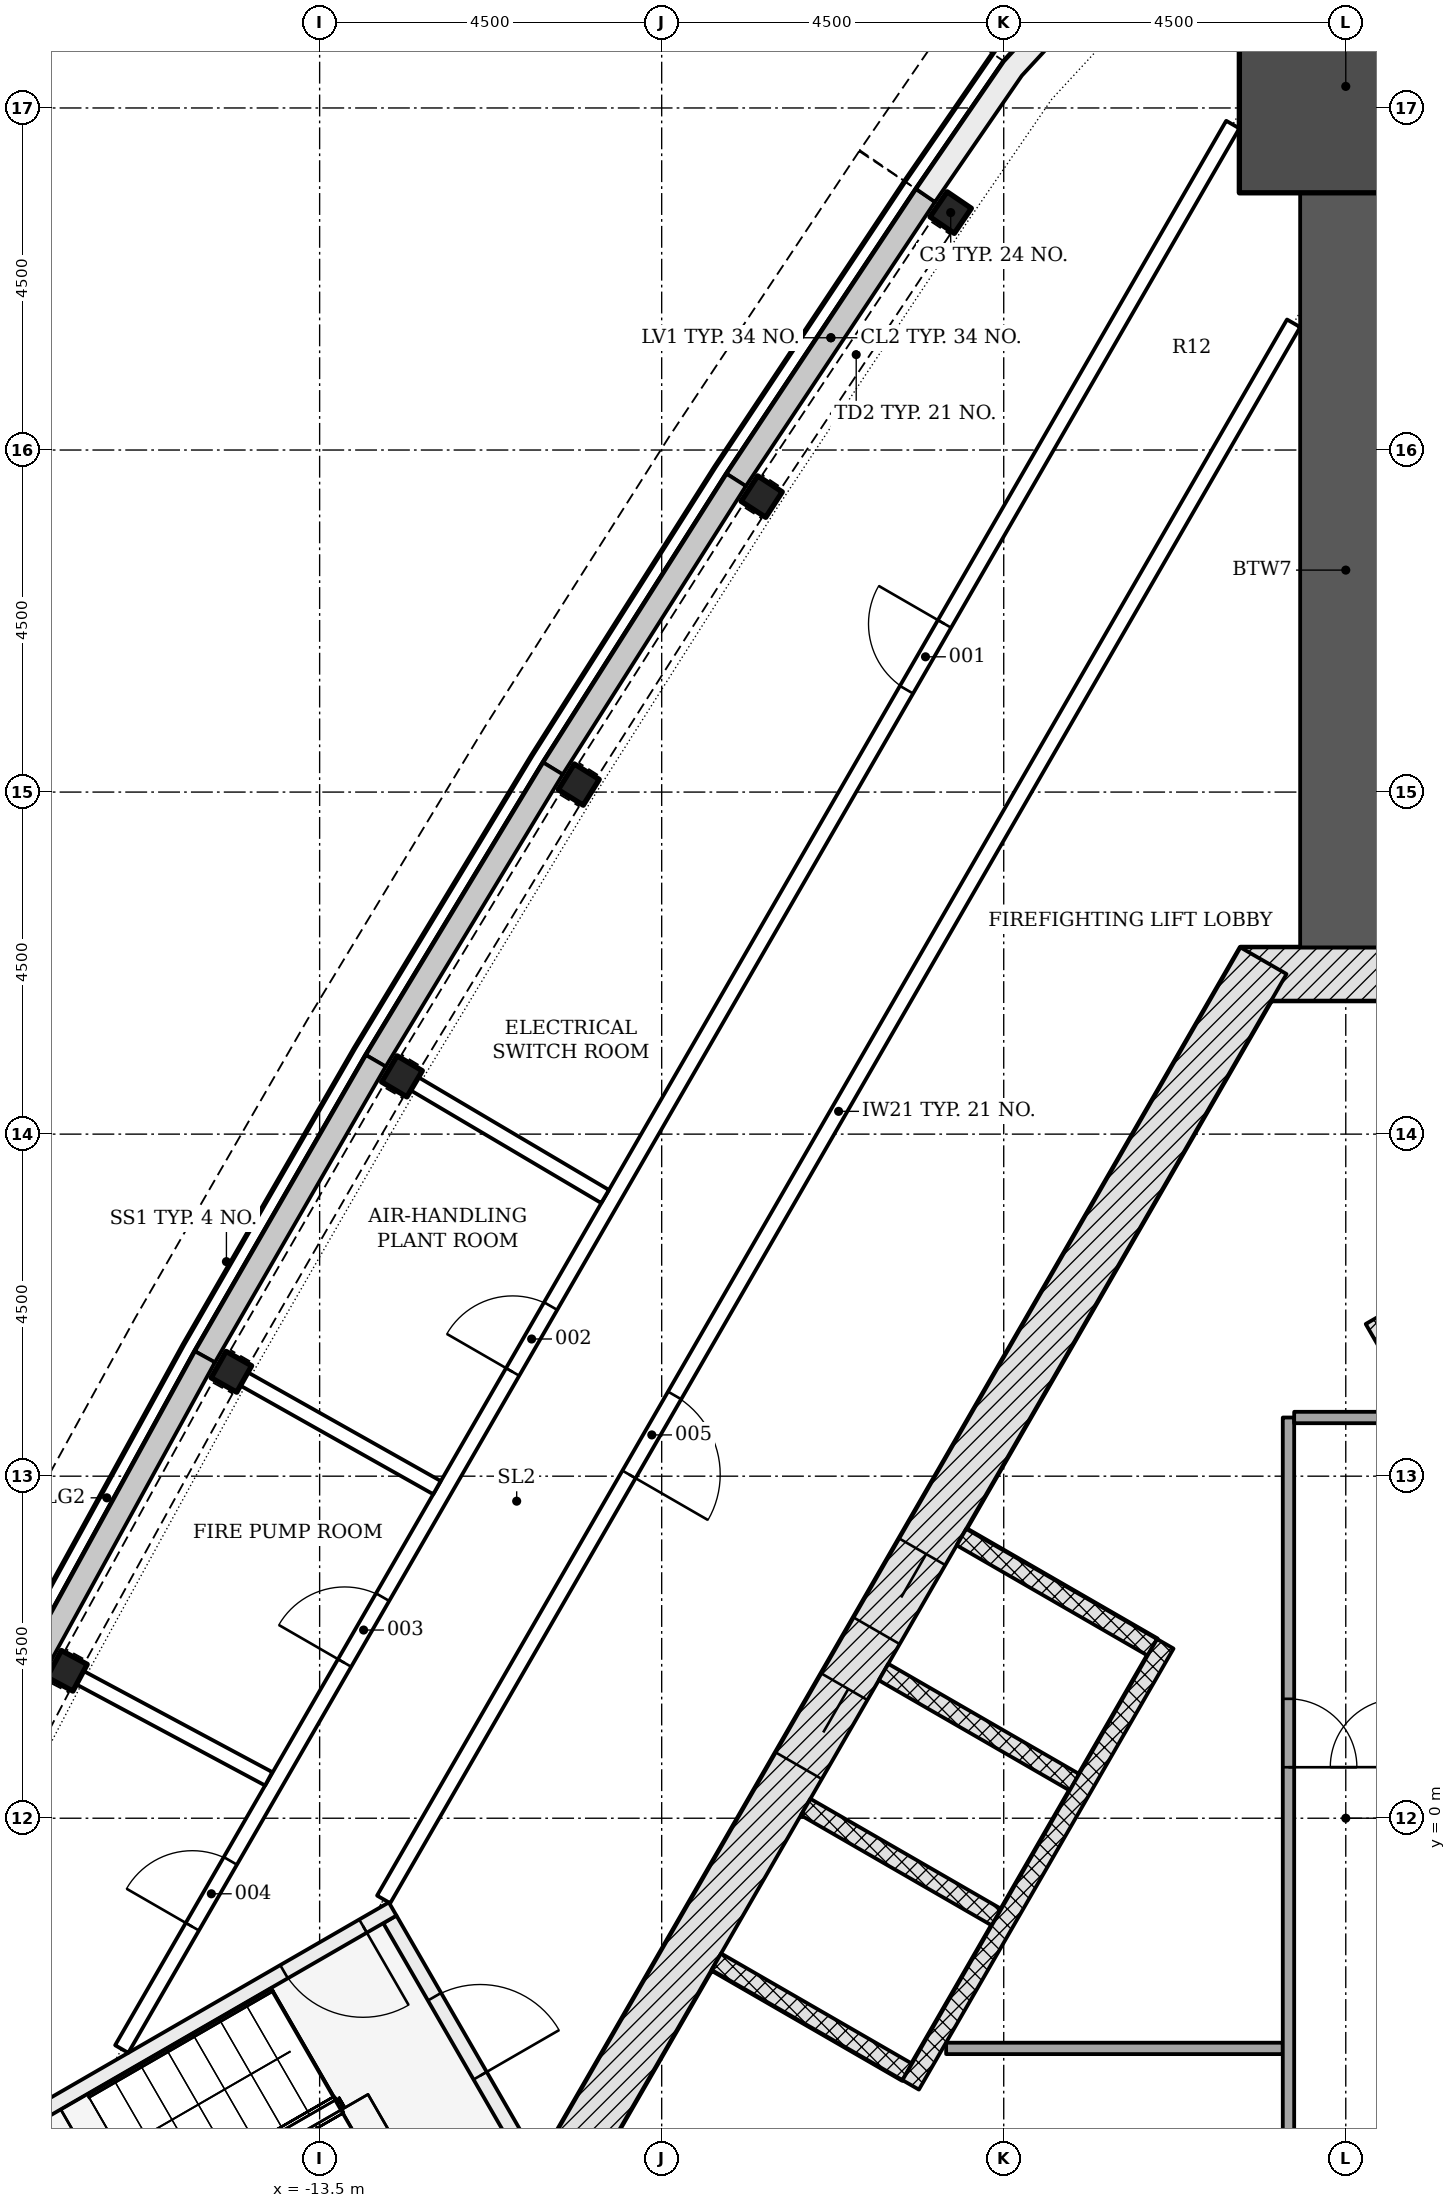
"""IFC4 building model, lengths in metres.
Left out: names, types, materials, properties, quantities, classifications, styles, units other than length and angle.
Written with IfcOpenShell. Run it as: python <this file> out.ifc"""

import sys

from ifc_helpers import new_model, si_unit, direction, frame, frame_2d, origin, origin_2d, place, context, subcontext, project, spatial, polyline, rectangle, i_section, outline, extrude, element, fill, save


model = new_model("IFC4")
c1 = context("Model", 3, precision=1e-05, world=origin(), true_north=direction((0.0, 1.0)))
c2 = subcontext(c1, "Body", "Model", "MODEL_VIEW")
j1 = project(units=[si_unit("LENGTHUNIT", "METRE"), si_unit("PLANEANGLEUNIT", "RADIAN")], contexts=[c1])
p1 = place(None, origin())
s1 = spatial("IfcSite", under=j1, at=p1, CompositionType="ELEMENT")
p2 = place(p1, origin())
s2 = spatial("IfcBuilding", under=s1, at=p2, CompositionType="ELEMENT")
p3 = place(p2, frame((0.0, 0.0, 168.9)))
s3 = spatial("IfcBuildingStorey", under=s2, at=p3, CompositionType="ELEMENT", Elevation=168.9)
p4 = place(p3, frame((1.386, 11.106, -0.3), z_axis=(0.0, 0.0, 1.0), x_axis=(-1.0, 0.0, 0.0)))
e1 = element("IfcWall", 1, at=p4, inside=s3, PredefinedType="SHEAR", context=c2, shape_type="SweptSolid", body=[
    extrude(rectangle(XDim=2.771, YDim=0.7, at=frame_2d((1.386, 0.0))), origin(), (0.0, 0.0, 1.0), 5.5),
])
p5 = place(p3, frame((-1.083, 11.281, -0.3), z_axis=(0.0, 0.0, 1.0), x_axis=(-0.500001446645, -0.866024568562, 0.0)))
e2 = element("IfcWall", 2, at=p5, inside=s3, PredefinedType="SHEAR", context=c2, shape_type="SweptSolid", body=[
    extrude(rectangle(XDim=18.458, YDim=0.7, at=frame_2d((9.229, 0.0))), origin(), (0.0, 0.0, 1.0), 5.5),
])
p6 = place(p5, frame((8.979, 0.0, 0.3)))
e3 = element("IfcOpeningElement", 3, at=p6, cuts=e2, PredefinedType="OPENING", context=c2, shape_type="SweptSolid", body=[
    extrude(rectangle(XDim=1.2, YDim=2.1, at=frame_2d((0.6, 1.05))), frame((0.0, 0.36, 0.0), z_axis=(0.0, -1.0, 0.0), x_axis=(1.0, 0.0, 0.0)), (0.0, 0.0, 1.0), 0.72),
])
p7 = place(p5, frame((11.029, 0.0, 0.3)))
e4 = element("IfcOpeningElement", 4, at=p7, cuts=e2, PredefinedType="OPENING", context=c2, shape_type="SweptSolid", body=[
    extrude(rectangle(XDim=1.2, YDim=2.1, at=frame_2d((0.6, 1.05))), frame((0.0, 0.36, 0.0), z_axis=(0.0, -1.0, 0.0), x_axis=(1.0, 0.0, 0.0)), (0.0, 0.0, 1.0), 0.72),
])
p8 = place(p3, frame((0.0, 11.456, -0.3), z_axis=(0.0, 0.0, 1.0), x_axis=(0.0, 1.0, 0.0)))
e5 = element("IfcWall", 5, at=p8, inside=s3, PredefinedType="SHEAR", context=c2, shape_type="SweptSolid", body=[
    extrude(rectangle(XDim=9.928, YDim=1.2, at=frame_2d((4.964, 0.0))), origin(), (0.0, 0.0, 1.0), 5.5),
])
p9 = place(p3, frame((0.0, 22.784, -0.3), z_axis=(0.0, 0.0, 1.0), x_axis=(0.0, 1.0, 0.0)))
e6 = element("IfcColumn", 6, at=p9, inside=s3, PredefinedType="COLUMN", context=c2, shape_type="SweptSolid", body=[
    extrude(rectangle(XDim=2.8, YDim=2.8, at=origin_2d()), origin(), (0.0, 0.0, 1.0), 5.5),
])
for number, where, z_axis, x_axis in (
    (7, (-5.198, 21.124, -0.3), (0.0, 0.0, 1.0), (-0.563, -0.827, 0.0)),
    (8, (-7.684, 17.387, -0.3), (0.0, 0.0, 1.0), (-0.545, -0.838, 0.0)),
    (9, (-10.091, 13.599, -0.3), (0.0, 0.0, 1.0), (-0.527, -0.85, 0.0)),
    (10, (-12.417, 9.76, -0.3), (0.0, 0.0, 1.0), (-0.509, -0.861, 0.0)),
    (11, (-14.661, 5.873, -0.3), (0.0, 0.0, 1.0), (-0.491, -0.871, 0.0)),
    (12, (-16.822, 1.939, -0.3), (0.0, 0.0, 1.0), (-0.472, -0.881, 0.0)),
):
    element("IfcColumn", number, at=place(p3, frame(where, z_axis=z_axis, x_axis=x_axis)), inside=s3, PredefinedType="COLUMN", context=c2, shape_type="SweptSolid", body=[
        extrude(i_section(OverallWidth=0.399, OverallDepth=0.386, WebThickness=0.021, FlangeThickness=0.033, FilletRadius=0.015, at=origin_2d()), origin(), (0.0, 0.0, 1.0), 5.5),
    ])
p10 = place(p3, origin())
e13 = element("IfcWall", 13, at=p10, inside=s3, PredefinedType="NOTDEFINED", context=c2, shape_type="SweptSolid", body=[
    extrude(outline(polyline([(-5.652, 21.433), (-8.145, 17.687), (-7.896, 17.521), (-5.403, 21.267), (-5.652, 21.433)])), origin(), (0.0, 0.0, 1.0), 1.2),
])
p11 = place(p3, origin())
e14 = element("IfcWall", 14, at=p11, inside=s3, PredefinedType="NOTDEFINED", context=c2, shape_type="SweptSolid", body=[
    extrude(outline(polyline([(-8.145, 17.687), (-10.558, 13.889), (-10.305, 13.728), (-7.892, 17.526), (-8.145, 17.687)])), origin(), (0.0, 0.0, 1.0), 1.2),
])
p12 = place(p3, origin())
e15 = element("IfcWall", 15, at=p12, inside=s3, PredefinedType="NOTDEFINED", context=c2, shape_type="SweptSolid", body=[
    extrude(outline(polyline([(-10.558, 13.889), (-12.89, 10.04), (-12.634, 9.885), (-10.302, 13.733), (-10.558, 13.889)])), origin(), (0.0, 0.0, 1.0), 1.2),
])
p13 = place(p3, origin())
e16 = element("IfcWall", 16, at=p13, inside=s3, PredefinedType="NOTDEFINED", context=c2, shape_type="SweptSolid", body=[
    extrude(outline(polyline([(-12.89, 10.04), (-15.14, 6.143), (-14.88, 5.993), (-12.63, 9.89), (-12.89, 10.04)])), origin(), (0.0, 0.0, 1.0), 1.2),
])
p14 = place(p3, origin())
e17 = element("IfcWall", 17, at=p14, inside=s3, PredefinedType="NOTDEFINED", context=c2, shape_type="SweptSolid", body=[
    extrude(outline(polyline([(-15.14, 6.143), (-17.307, 2.199), (-17.044, 2.055), (-14.877, 5.999), (-15.14, 6.143)])), origin(), (0.0, 0.0, 1.0), 1.2),
])
p15 = place(p3, origin())
e18 = element("IfcWall", 18, at=p15, inside=s3, PredefinedType="NOTDEFINED", context=c2, shape_type="SweptSolid", body=[
    extrude(outline(polyline([(5.652, 21.433), (4.497, 23.113), (3.478, 24.218), (2.198, 25.004), (0.751, 25.412), (-0.751, 25.412), (-2.198, 25.004), (-3.478, 24.218), (-4.497, 23.113), (-5.652, 21.433), (-5.405, 21.263), (-4.262, 22.926), (-3.286, 23.984), (-2.076, 24.727), (-0.71, 25.112), (0.71, 25.112), (2.076, 24.727), (3.286, 23.984), (4.262, 22.926), (5.405, 21.263), (5.652, 21.433)])), origin(), (0.0, 0.0, 1.0), 5.2),
])
p16 = place(p3, frame((5.87, -2.961, 0.0), z_axis=(0.0, 0.0, 1.0), x_axis=(-0.50000615651, 0.866021849293, 0.0)))
e19 = element("IfcWall", 19, at=p16, inside=s3, PredefinedType="PARTITIONING", context=c2, shape_type="SweptSolid", body=[
    extrude(rectangle(XDim=11.0, YDim=0.25, at=frame_2d((5.5, 0.0))), origin(), (0.0, 0.0, 1.0), 5.2),
])
for number, where, z_axis, x_axis in (
    (20, (-5.056, 3.699, -0.3), (0.0, 0.0, 1.0), (0.866, -0.5, 0.0)),
    (21, (-6.081, 1.923, -0.3), (0.0, 0.0, 1.0), (0.866, -0.5, 0.0)),
    (22, (-7.106, 0.148, -0.3), (0.0, 0.0, 1.0), (0.866, -0.5, 0.0)),
    (23, (-8.281, -1.887, -0.3), (0.0, 0.0, 1.0), (0.866, -0.5, 0.0)),
):
    element("IfcWall", number, at=place(p3, frame(where, z_axis=z_axis, x_axis=x_axis)), inside=s3, PredefinedType="PARTITIONING", context=c2, shape_type="SweptSolid", body=[
        extrude(rectangle(XDim=2.9, YDim=0.25, at=frame_2d((1.45, 0.0))), origin(), (0.0, 0.0, 1.0), 5.5),
    ])
p17 = place(p3, frame((-2.374, 2.294, 0.0), z_axis=(0.0, 0.0, 1.0), x_axis=(-0.500003174267, -0.866023571113, 0.0)))
e24 = element("IfcWall", 24, at=p17, inside=s3, PredefinedType="PARTITIONING", context=c2, shape_type="SweptSolid", body=[
    extrude(rectangle(XDim=6.7, YDim=0.25, at=frame_2d((3.35, 0.0))), origin(), (0.0, 0.0, 1.0), 5.2),
])
p18 = place(p3, frame((-5.258, -3.028, 0.0), z_axis=(0.0, 0.0, 1.0), x_axis=(1.0, 0.0, 0.0)))
e25 = element("IfcWall", 25, at=p18, inside=s3, PredefinedType="PARTITIONING", context=c2, shape_type="SweptSolid", body=[
    extrude(rectangle(XDim=4.429, YDim=0.15, at=frame_2d((2.215, 0.0))), origin(), (0.0, 0.0, 1.0), 5.2),
])
p19 = place(p3, frame((-0.754, 5.272, 0.0), z_axis=(0.0, 0.0, 1.0), x_axis=(0.0, -1.0, 0.0)))
e26 = element("IfcWall", 26, at=p19, inside=s3, PredefinedType="PARTITIONING", context=c2, shape_type="SweptSolid", body=[
    extrude(rectangle(XDim=11.5, YDim=0.15, at=frame_2d((5.75, 0.0))), origin(), (0.0, 0.0, 1.0), 5.2),
])
p20 = place(p19, frame((3.701, 0.0, 0.0)))
e27 = element("IfcOpeningElement", 27, at=p20, cuts=e26, PredefinedType="OPENING", context=c2, shape_type="SweptSolid", body=[
    extrude(rectangle(XDim=0.9, YDim=2.1, at=frame_2d((0.45, 1.05))), frame((0.0, 0.085, 0.0), z_axis=(0.0, -1.0, 0.0), x_axis=(1.0, 0.0, 0.0)), (0.0, 0.0, 1.0), 0.17),
])
p21 = place(p3, frame((-0.679, 5.272, 0.0), z_axis=(0.0, 0.0, 1.0), x_axis=(1.0, 0.0, 0.0)))
e28 = element("IfcWall", 28, at=p21, inside=s3, PredefinedType="PARTITIONING", context=c2, shape_type="SweptSolid", body=[
    extrude(rectangle(XDim=1.3, YDim=0.15, at=frame_2d((0.65, 0.0))), origin(), (0.0, 0.0, 1.0), 5.2),
])
p22 = place(p3, frame((-12.576, -1.331, -0.3), z_axis=(0.0, 0.0, 1.0), x_axis=(0.499970499736, -0.8660424351, 0.0)))
e29 = element("IfcWall", 29, at=p22, inside=s3, PredefinedType="SHEAR", context=c2, shape_type="SweptSolid", body=[
    extrude(rectangle(XDim=3.55, YDim=0.2, at=frame_2d((1.775, 0.0))), origin(), (0.0, 0.0, 1.0), 5.5),
])
p23 = place(p22, frame((1.175, 0.0, 0.3)))
e30 = element("IfcOpeningElement", 30, at=p23, cuts=e29, PredefinedType="OPENING", context=c2, shape_type="SweptSolid", body=[
    extrude(rectangle(XDim=1.2, YDim=2.1, at=frame_2d((0.6, 1.05))), frame((0.0, 0.11, 0.0), z_axis=(0.0, -1.0, 0.0), x_axis=(1.0, 0.0, 0.0)), (0.0, 0.0, 1.0), 0.22),
])
p24 = place(p3, frame((-12.539, -1.194, -0.3), z_axis=(0.0, 0.0, 1.0), x_axis=(-0.866045472092, -0.499965239061, 0.0)))
e31 = element("IfcWall", 31, at=p24, inside=s3, PredefinedType="SHEAR", context=c2, shape_type="SweptSolid", body=[
    extrude(rectangle(XDim=5.6, YDim=0.2, at=frame_2d((2.8, 0.0))), origin(), (0.0, 0.0, 1.0), 5.5),
])
p25 = place(p24, frame((0.45, 0.0, 0.3)))
e32 = element("IfcOpeningElement", 32, at=p25, cuts=e31, PredefinedType="OPENING", context=c2, shape_type="SweptSolid", body=[
    extrude(rectangle(XDim=1.2, YDim=2.1, at=frame_2d((0.6, 1.05))), frame((0.0, 0.11, 0.0), z_axis=(0.0, -1.0, 0.0), x_axis=(1.0, 0.0, 0.0)), (0.0, 0.0, 1.0), 0.22),
])
p26 = place(p3, frame((0.0, 0.0, -0.3)))
e33 = element("IfcWall", 33, at=p26, inside=s3, PredefinedType="SHEAR", context=c2, shape_type="SweptSolid", body=[
    extrude(outline(polyline([(-17.439, -3.907), (-18.025, -6.093), (-16.95, -7.955), (-16.777, -7.855), (-17.81, -6.065), (-17.267, -4.039), (-17.339, -4.081), (-17.339, -4.081), (-17.339, -4.081), (-17.339, -4.081), (-17.339, -4.081), (-17.339, -4.081), (-17.339, -4.081), (-17.339, -4.081), (-17.339, -4.081), (-17.339, -4.081), (-17.339, -4.081), (-17.339, -4.081), (-17.339, -4.081), (-17.339, -4.081), (-17.339, -4.081), (-17.339, -4.081), (-17.339, -4.081), (-17.439, -3.907)])), origin(), (0.0, 0.0, 1.0), 5.5),
])
p27 = place(p3, frame((-0.687, 19.667, 0.0), z_axis=(0.0, 0.0, 1.0), x_axis=(-0.500000491645, -0.866025119933, 0.0)))
e34 = element("IfcWall", 34, at=p27, inside=s3, PredefinedType="PARTITIONING", context=c2, shape_type="SweptSolid", body=[
    extrude(rectangle(XDim=23.943, YDim=0.2, at=frame_2d((11.971, 0.0))), origin(), (0.0, 0.0, 1.0), 4.647),
])
p28 = place(p27, frame((16.287, 0.0, 0.0)))
e35 = element("IfcOpeningElement", 35, at=p28, cuts=e34, PredefinedType="OPENING", context=c2, shape_type="SweptSolid", body=[
    extrude(rectangle(XDim=1.2, YDim=2.1, at=frame_2d((0.6, 1.05))), frame((0.0, 0.11, 0.0), z_axis=(0.0, -1.0, 0.0), x_axis=(1.0, 0.0, 0.0)), (0.0, 0.0, 1.0), 0.22),
])
p29 = place(p3, frame((-16.104, -3.037, 0.0), z_axis=(0.0, 0.0, 1.0), x_axis=(0.500000282061, 0.866025240936, 0.0)))
e36 = element("IfcWall", 36, at=p29, inside=s3, PredefinedType="PARTITIONING", context=c2, shape_type="SweptSolid", body=[
    extrude(rectangle(XDim=29.235, YDim=0.2, at=frame_2d((14.617, 0.0))), origin(), (0.0, 0.0, 1.0), 4.647),
])
p30 = place(p29, frame((20.65, 0.0, 0.0)))
e37 = element("IfcOpeningElement", 37, at=p30, cuts=e36, PredefinedType="OPENING", context=c2, shape_type="SweptSolid", body=[
    extrude(rectangle(XDim=1.0, YDim=2.1, at=frame_2d((0.5, 1.05))), frame((0.0, 0.11, 0.0), z_axis=(0.0, -1.0, 0.0), x_axis=(1.0, 0.0, 0.0)), (0.0, 0.0, 1.0), 0.22),
])
p31 = place(p29, frame((10.287, 0.0, 0.0)))
e38 = element("IfcOpeningElement", 38, at=p31, cuts=e36, PredefinedType="OPENING", context=c2, shape_type="SweptSolid", body=[
    extrude(rectangle(XDim=1.0, YDim=2.1, at=frame_2d((0.5, 1.05))), frame((0.0, 0.11, 0.0), z_axis=(0.0, -1.0, 0.0), x_axis=(1.0, 0.0, 0.0)), (0.0, 0.0, 1.0), 0.22),
])
p32 = place(p29, frame((5.865, 0.0, 0.0)))
e39 = element("IfcOpeningElement", 39, at=p32, cuts=e36, PredefinedType="OPENING", context=c2, shape_type="SweptSolid", body=[
    extrude(rectangle(XDim=1.0, YDim=2.1, at=frame_2d((0.5, 1.05))), frame((0.0, 0.11, 0.0), z_axis=(0.0, -1.0, 0.0), x_axis=(1.0, 0.0, 0.0)), (0.0, 0.0, 1.0), 0.22),
])
p33 = place(p29, frame((1.859, 0.0, 0.0)))
e40 = element("IfcOpeningElement", 40, at=p33, cuts=e36, PredefinedType="OPENING", context=c2, shape_type="SweptSolid", body=[
    extrude(rectangle(XDim=1.0, YDim=2.1, at=frame_2d((0.5, 1.05))), frame((0.0, 0.11, 0.0), z_axis=(0.0, -1.0, 0.0), x_axis=(1.0, 0.0, 0.0)), (0.0, 0.0, 1.0), 0.22),
])
p34 = place(p3, frame((-12.288, 9.684, 0.0), z_axis=(0.0, 0.0, 1.0), x_axis=(0.860699381133, -0.509113519088, 0.0)))
e41 = element("IfcWall", 41, at=p34, inside=s3, PredefinedType="PARTITIONING", context=c2, shape_type="SweptSolid", body=[
    extrude(rectangle(XDim=2.954, YDim=0.2, at=frame_2d((1.477, 0.0))), origin(), (0.0, 0.0, 1.0), 4.647),
])
p35 = place(p3, frame((-14.53, 5.8, 0.0), z_axis=(0.0, 0.0, 1.0), x_axis=(0.871273012139, -0.490798673916, 0.0)))
e42 = element("IfcWall", 42, at=p35, inside=s3, PredefinedType="PARTITIONING", context=c2, shape_type="SweptSolid", body=[
    extrude(rectangle(XDim=2.954, YDim=0.2, at=frame_2d((1.477, 0.0))), origin(), (0.0, 0.0, 1.0), 4.647),
])
p36 = place(p3, frame((-16.69, 1.869, 0.0), z_axis=(0.0, 0.0, 1.0), x_axis=(0.88146473232, -0.472249855136, 0.0)))
e43 = element("IfcWall", 43, at=p36, inside=s3, PredefinedType="PARTITIONING", context=c2, shape_type="SweptSolid", body=[
    extrude(rectangle(XDim=2.858, YDim=0.2, at=frame_2d((1.429, 0.0))), origin(), (0.0, 0.0, 1.0), 4.647),
])
p37 = place(p6, origin())
e44 = element("IfcDoor", 44, at=p37, inside=s3, OperationType="DOUBLE_DOOR_SLIDING", PredefinedType="DOOR", context=c2, shape_type="SweptSolid", body=[
    extrude(rectangle(XDim=1.2, YDim=2.1, at=frame_2d((0.6, 1.05))), frame((0.0, 0.025, 0.0), z_axis=(0.0, -1.0, 0.0), x_axis=(1.0, 0.0, 0.0)), (0.0, 0.0, 1.0), 0.05),
])
fill(e3, e44)
p38 = place(p7, origin())
e45 = element("IfcDoor", 45, at=p38, inside=s3, OperationType="DOUBLE_DOOR_SLIDING", PredefinedType="DOOR", context=c2, shape_type="SweptSolid", body=[
    extrude(rectangle(XDim=1.2, YDim=2.1, at=frame_2d((0.6, 1.05))), frame((0.0, 0.025, 0.0), z_axis=(0.0, -1.0, 0.0), x_axis=(1.0, 0.0, 0.0)), (0.0, 0.0, 1.0), 0.05),
])
fill(e4, e45)
p39 = place(p20, origin())
e46 = element("IfcDoor", 46, at=p39, inside=s3, OperationType="SINGLE_SWING_RIGHT", PredefinedType="DOOR", context=c2, shape_type="SweptSolid", body=[
    extrude(rectangle(XDim=0.9, YDim=2.1, at=frame_2d((0.45, 1.05))), frame((0.0, 0.025, 0.0), z_axis=(0.0, -1.0, 0.0), x_axis=(1.0, 0.0, 0.0)), (0.0, 0.0, 1.0), 0.05),
])
fill(e27, e46)
p40 = place(p23, origin())
e47 = element("IfcDoor", 47, at=p40, inside=s3, OperationType="SINGLE_SWING_RIGHT", PredefinedType="DOOR", context=c2, shape_type="SweptSolid", body=[
    extrude(rectangle(XDim=1.2, YDim=2.1, at=frame_2d((0.6, 1.05))), frame((0.0, 0.025, 0.0), z_axis=(0.0, -1.0, 0.0), x_axis=(1.0, 0.0, 0.0)), (0.0, 0.0, 1.0), 0.05),
])
fill(e30, e47)
p41 = place(p25, origin())
e48 = element("IfcDoor", 48, at=p41, inside=s3, OperationType="SINGLE_SWING_LEFT", PredefinedType="DOOR", context=c2, shape_type="SweptSolid", body=[
    extrude(rectangle(XDim=1.2, YDim=2.1, at=frame_2d((0.6, 1.05))), frame((0.0, 0.025, 0.0), z_axis=(0.0, -1.0, 0.0), x_axis=(1.0, 0.0, 0.0)), (0.0, 0.0, 1.0), 0.05),
])
fill(e32, e48)
p42 = place(p30, origin())
e49 = element("IfcDoor", 49, at=p42, inside=s3, OperationType="SINGLE_SWING_RIGHT", PredefinedType="DOOR", context=c2, shape_type="SweptSolid", body=[
    extrude(rectangle(XDim=1.0, YDim=2.1, at=frame_2d((0.5, 1.05))), frame((0.0, 0.025, 0.0), z_axis=(0.0, -1.0, 0.0), x_axis=(1.0, 0.0, 0.0)), (0.0, 0.0, 1.0), 0.05),
])
fill(e37, e49)
p43 = place(p31, origin())
e50 = element("IfcDoor", 50, at=p43, inside=s3, OperationType="SINGLE_SWING_LEFT", PredefinedType="DOOR", context=c2, shape_type="SweptSolid", body=[
    extrude(rectangle(XDim=1.0, YDim=2.1, at=frame_2d((0.5, 1.05))), frame((0.0, 0.025, 0.0), z_axis=(0.0, -1.0, 0.0), x_axis=(1.0, 0.0, 0.0)), (0.0, 0.0, 1.0), 0.05),
])
fill(e38, e50)
p44 = place(p32, origin())
e51 = element("IfcDoor", 51, at=p44, inside=s3, OperationType="SINGLE_SWING_LEFT", PredefinedType="DOOR", context=c2, shape_type="SweptSolid", body=[
    extrude(rectangle(XDim=1.0, YDim=2.1, at=frame_2d((0.5, 1.05))), frame((0.0, 0.025, 0.0), z_axis=(0.0, -1.0, 0.0), x_axis=(1.0, 0.0, 0.0)), (0.0, 0.0, 1.0), 0.05),
])
fill(e39, e51)
p45 = place(p33, origin())
e52 = element("IfcDoor", 52, at=p45, inside=s3, OperationType="SINGLE_SWING_LEFT", PredefinedType="DOOR", context=c2, shape_type="SweptSolid", body=[
    extrude(rectangle(XDim=1.0, YDim=2.1, at=frame_2d((0.5, 1.05))), frame((0.0, 0.025, 0.0), z_axis=(0.0, -1.0, 0.0), x_axis=(1.0, 0.0, 0.0)), (0.0, 0.0, 1.0), 0.05),
])
fill(e40, e52)
p46 = place(p28, origin())
e53 = element("IfcDoor", 53, at=p46, inside=s3, OperationType="SINGLE_SWING_RIGHT", PredefinedType="DOOR", context=c2, shape_type="SweptSolid", body=[
    extrude(rectangle(XDim=1.2, YDim=2.1, at=frame_2d((0.6, 1.05))), frame((0.0, 0.025, 0.0), z_axis=(0.0, -1.0, 0.0), x_axis=(1.0, 0.0, 0.0)), (0.0, 0.0, 1.0), 0.05),
])
fill(e35, e53)
save(model, sys.argv[1])
